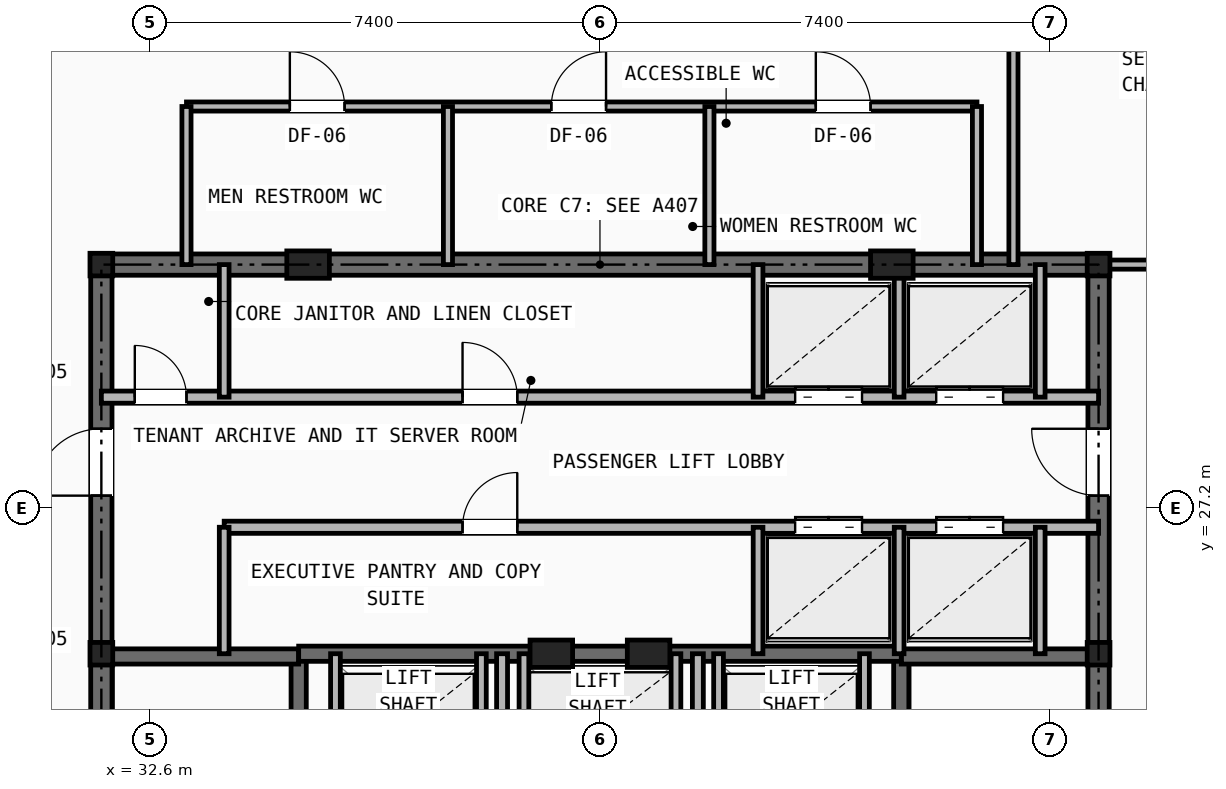
"""IFC4 building model, lengths in metres.
Left out: names, types, materials, properties, quantities, classifications, styles, units other than length and angle.
Written with IfcOpenShell. Run it as: python <this file> out.ifc"""

import sys

from ifc_helpers import new_model, si_unit, direction, frame, frame_2d, origin, origin_2d, place, context, subcontext, project, spatial, rectangle, i_section, extrude, element, fill, save


model = new_model("IFC4")
c1 = context("Model", 3, precision=1e-05, world=origin(), true_north=direction((0.0, 1.0)))
c2 = subcontext(c1, "Body", "Model", "MODEL_VIEW")
j1 = project(units=[si_unit("LENGTHUNIT", "METRE"), si_unit("PLANEANGLEUNIT", "RADIAN")], contexts=[c1])
p1 = place(None, origin())
s1 = spatial("IfcSite", under=j1, at=p1, CompositionType="ELEMENT")
p2 = place(p1, origin())
s2 = spatial("IfcBuilding", under=s1, at=p2, CompositionType="ELEMENT")
p3 = place(p2, frame((0.0, 0.0, 236.4)))
s3 = spatial("IfcBuildingStorey", under=s2, at=p3, CompositionType="ELEMENT", Elevation=236.4)
for number, where, z_axis, x_axis in (
    (1, (31.8, 24.8, 0.0), (0.0, 0.0, 1.0), (1.0, 0.0, 0.0)),
    (2, (48.2, 24.8, 0.0), (0.0, 0.0, 1.0), (1.0, 0.0, 0.0)),
    (3, (31.8, 31.2, 0.0), (0.0, 0.0, 1.0), (1.0, 0.0, 0.0)),
    (4, (48.2, 31.2, 0.0), (0.0, 0.0, 1.0), (1.0, 0.0, 0.0)),
):
    element("IfcColumn", number, at=place(p3, frame(where, z_axis=z_axis, x_axis=x_axis)), inside=s3, PredefinedType="COLUMN", context=c2, shape_type="SweptSolid", body=[
        extrude(i_section(OverallWidth=0.374, OverallDepth=0.372, WebThickness=0.016, FlangeThickness=0.026, at=origin_2d()), origin(), (0.0, 0.0, 1.0), 3.5),
    ])
for number, where, z_axis, x_axis in (
    (5, (35.2, 31.2, 0.0), (0.0, 0.0, 1.0), (1.0, 0.0, 0.0)),
    (6, (44.8, 31.2, 0.0), (0.0, 0.0, 1.0), (1.0, 0.0, 0.0)),
    (7, (39.2, 24.8, 0.0), (0.0, 0.0, 1.0), (1.0, 0.0, 0.0)),
    (8, (40.8, 24.8, 0.0), (0.0, 0.0, 1.0), (1.0, 0.0, 0.0)),
):
    element("IfcColumn", number, at=place(p3, frame(where, z_axis=z_axis, x_axis=x_axis)), inside=s3, PredefinedType="PILASTER", context=c2, shape_type="SweptSolid", body=[
        extrude(rectangle(XDim=0.7, YDim=0.45, at=origin_2d()), origin(), (0.0, 0.0, 1.0), 3.5),
    ])
p4 = place(p3, frame((31.8, 31.2, 0.0), z_axis=(0.0, 0.0, 1.0), x_axis=(1.0, 0.0, 0.0)))
e9 = element("IfcWall", 9, at=p4, inside=s3, PredefinedType="SHEAR", context=c2, shape_type="SweptSolid", body=[
    extrude(rectangle(XDim=16.4, YDim=0.35, at=frame_2d((8.2, 0.0))), origin(), (0.0, 0.0, 1.0), 3.25),
])
p5 = place(p3, frame((31.8, 16.4, 0.0), z_axis=(0.0, 0.0, 1.0), x_axis=(0.0, 1.0, 0.0)))
e10 = element("IfcWall", 10, at=p5, inside=s3, PredefinedType="SHEAR", context=c2, shape_type="SweptSolid", body=[
    extrude(rectangle(XDim=14.8, YDim=0.35, at=frame_2d((7.4, 0.0))), origin(), (0.0, 0.0, 1.0), 3.25),
])
p6 = place(p5, frame((11.0, 0.0, 0.0)))
e11 = element("IfcOpeningElement", 11, at=p6, cuts=e10, PredefinedType="OPENING", context=c2, shape_type="SweptSolid", body=[
    extrude(rectangle(XDim=1.1, YDim=2.15, at=frame_2d((0.55, 1.075))), frame((0.0, 0.185, 0.0), z_axis=(0.0, -1.0, 0.0), x_axis=(1.0, 0.0, 0.0)), (0.0, 0.0, 1.0), 0.37),
])
p7 = place(p3, frame((48.2, 16.4, 0.0), z_axis=(0.0, 0.0, 1.0), x_axis=(0.0, 1.0, 0.0)))
e12 = element("IfcWall", 12, at=p7, inside=s3, PredefinedType="SHEAR", context=c2, shape_type="SweptSolid", body=[
    extrude(rectangle(XDim=14.8, YDim=0.35, at=frame_2d((7.4, 0.0))), origin(), (0.0, 0.0, 1.0), 3.25),
])
p8 = place(p7, frame((11.0, 0.0, 0.0)))
e13 = element("IfcOpeningElement", 13, at=p8, cuts=e12, PredefinedType="OPENING", context=c2, shape_type="SweptSolid", body=[
    extrude(rectangle(XDim=1.1, YDim=2.15, at=frame_2d((0.55, 1.075))), frame((0.0, 0.185, 0.0), z_axis=(0.0, -1.0, 0.0), x_axis=(1.0, 0.0, 0.0)), (0.0, 0.0, 1.0), 0.37),
])
p9 = place(p3, frame((35.045, 16.4, 0.0), z_axis=(0.0, 0.0, 1.0), x_axis=(0.0, 1.0, 0.0)))
e14 = element("IfcWall", 14, at=p9, inside=s3, PredefinedType="SHEAR", context=c2, shape_type="SweptSolid", body=[
    extrude(rectangle(XDim=8.4, YDim=0.25, at=frame_2d((4.2, 0.0))), origin(), (0.0, 0.0, 1.0), 3.25),
])
p10 = place(p9, frame((0.45, 0.0, 0.0)))
e15 = element("IfcOpeningElement", 15, at=p10, cuts=e14, PredefinedType="OPENING", context=c2, shape_type="SweptSolid", body=[
    extrude(rectangle(XDim=0.95, YDim=2.1, at=frame_2d((0.475, 1.05))), frame((0.0, 0.135, 0.0), z_axis=(0.0, -1.0, 0.0), x_axis=(1.0, 0.0, 0.0)), (0.0, 0.0, 1.0), 0.27),
])
p11 = place(p3, frame((31.8, 24.755, 0.0), z_axis=(0.0, 0.0, 1.0), x_axis=(1.0, 0.0, 0.0)))
e16 = element("IfcWall", 16, at=p11, inside=s3, PredefinedType="SHEAR", context=c2, shape_type="SweptSolid", body=[
    extrude(rectangle(XDim=3.245, YDim=0.25, at=frame_2d((1.623, 0.0))), origin(), (0.0, 0.0, 1.0), 3.25),
])
p12 = place(p3, frame((44.955, 16.4, 0.0), z_axis=(0.0, 0.0, 1.0), x_axis=(0.0, 1.0, 0.0)))
e17 = element("IfcWall", 17, at=p12, inside=s3, PredefinedType="SHEAR", context=c2, shape_type="SweptSolid", body=[
    extrude(rectangle(XDim=8.4, YDim=0.25, at=frame_2d((4.2, 0.0))), origin(), (0.0, 0.0, 1.0), 3.25),
])
p13 = place(p12, frame((0.45, 0.0, 0.0)))
e18 = element("IfcOpeningElement", 18, at=p13, cuts=e17, PredefinedType="OPENING", context=c2, shape_type="SweptSolid", body=[
    extrude(rectangle(XDim=0.95, YDim=2.1, at=frame_2d((0.475, 1.05))), frame((0.0, 0.135, 0.0), z_axis=(0.0, -1.0, 0.0), x_axis=(1.0, 0.0, 0.0)), (0.0, 0.0, 1.0), 0.27),
])
p14 = place(p3, frame((44.955, 24.755, 0.0), z_axis=(0.0, 0.0, 1.0), x_axis=(1.0, 0.0, 0.0)))
e19 = element("IfcWall", 19, at=p14, inside=s3, PredefinedType="SHEAR", context=c2, shape_type="SweptSolid", body=[
    extrude(rectangle(XDim=3.245, YDim=0.25, at=frame_2d((1.623, 0.0))), origin(), (0.0, 0.0, 1.0), 3.25),
])
p15 = place(p3, frame((35.045, 24.8, 0.0), z_axis=(0.0, 0.0, 1.0), x_axis=(1.0, 0.0, 0.0)))
e20 = element("IfcWall", 20, at=p15, inside=s3, PredefinedType="SHEAR", context=c2, shape_type="SweptSolid", body=[
    extrude(rectangle(XDim=9.91, YDim=0.25, at=frame_2d((4.955, 0.0))), origin(), (0.0, 0.0, 1.0), 3.25),
])
p16 = place(p3, frame((38.39, 16.4, 0.0), z_axis=(0.0, 0.0, 1.0), x_axis=(0.0, 1.0, 0.0)))
e21 = element("IfcWall", 21, at=p16, inside=s3, PredefinedType="PARTITIONING", context=c2, shape_type="SweptSolid", body=[
    extrude(rectangle(XDim=8.4, YDim=0.18, at=frame_2d((4.2, 0.0))), origin(), (0.0, 0.0, 1.0), 2.705),
])
p17 = place(p16, frame((3.8, 0.0, 0.0)))
e22 = element("IfcOpeningElement", 22, at=p17, cuts=e21, PredefinedType="OPENING", context=c2, shape_type="SweptSolid", body=[
    extrude(rectangle(XDim=0.95, YDim=2.1, at=frame_2d((0.475, 1.05))), frame((0.0, 0.1, 0.0), z_axis=(0.0, -1.0, 0.0), x_axis=(1.0, 0.0, 0.0)), (0.0, 0.0, 1.0), 0.2),
])
p18 = place(p3, frame((41.61, 16.4, 0.0), z_axis=(0.0, 0.0, 1.0), x_axis=(0.0, 1.0, 0.0)))
e23 = element("IfcWall", 23, at=p18, inside=s3, PredefinedType="PARTITIONING", context=c2, shape_type="SweptSolid", body=[
    extrude(rectangle(XDim=8.4, YDim=0.18, at=frame_2d((4.2, 0.0))), origin(), (0.0, 0.0, 1.0), 2.705),
])
for number, where, z_axis, x_axis in (
    (24, (35.65, 22.48, 0.0), (0.0, 0.0, 1.0), (0.0, 1.0, 0.0)),
    (25, (38.05, 22.48, 0.0), (0.0, 0.0, 1.0), (0.0, 1.0, 0.0)),
    (26, (41.95, 22.48, 0.0), (0.0, 0.0, 1.0), (0.0, 1.0, 0.0)),
    (27, (44.35, 22.48, 0.0), (0.0, 0.0, 1.0), (0.0, 1.0, 0.0)),
    (28, (38.75, 22.48, 0.0), (0.0, 0.0, 1.0), (0.0, 1.0, 0.0)),
    (29, (41.25, 22.48, 0.0), (0.0, 0.0, 1.0), (0.0, 1.0, 0.0)),
):
    element("IfcWall", number, at=place(p3, frame(where, z_axis=z_axis, x_axis=x_axis)), inside=s3, PredefinedType="SOLIDWALL", context=c2, shape_type="SweptSolid", body=[
        extrude(rectangle(XDim=2.32, YDim=0.16, at=frame_2d((1.16, 0.0))), origin(), (0.0, 0.0, 1.0), 3.25),
    ])
p19 = place(p3, frame((31.8, 29.02, 0.0), z_axis=(0.0, 0.0, 1.0), x_axis=(1.0, 0.0, 0.0)))
e30 = element("IfcWall", 30, at=p19, inside=s3, PredefinedType="SOLIDWALL", context=c2, shape_type="SweptSolid", body=[
    extrude(rectangle(XDim=16.4, YDim=0.2, at=frame_2d((8.2, 0.0))), origin(), (0.0, 0.0, 1.0), 2.705),
])
p20 = place(p19, frame((0.55, 0.0, 0.0)))
e31 = element("IfcOpeningElement", 31, at=p20, cuts=e30, PredefinedType="OPENING", context=c2, shape_type="SweptSolid", body=[
    extrude(rectangle(XDim=0.85, YDim=2.05, at=frame_2d((0.425, 1.025))), frame((0.0, 0.11, 0.0), z_axis=(0.0, -1.0, 0.0), x_axis=(1.0, 0.0, 0.0)), (0.0, 0.0, 1.0), 0.22),
])
p21 = place(p19, frame((5.94, 0.0, 0.0)))
e32 = element("IfcOpeningElement", 32, at=p21, cuts=e30, PredefinedType="OPENING", context=c2, shape_type="SweptSolid", body=[
    extrude(rectangle(XDim=0.9, YDim=2.1, at=frame_2d((0.45, 1.05))), frame((0.0, 0.11, 0.0), z_axis=(0.0, -1.0, 0.0), x_axis=(1.0, 0.0, 0.0)), (0.0, 0.0, 1.0), 0.22),
])
p22 = place(p19, frame((11.41, 0.0, 0.0)))
e33 = element("IfcOpeningElement", 33, at=p22, cuts=e30, PredefinedType="OPENING", context=c2, shape_type="SweptSolid", body=[
    extrude(rectangle(XDim=1.1, YDim=2.15, at=frame_2d((0.55, 1.075))), frame((0.0, 0.11, 0.0), z_axis=(0.0, -1.0, 0.0), x_axis=(1.0, 0.0, 0.0)), (0.0, 0.0, 1.0), 0.22),
])
p23 = place(p19, frame((13.73, 0.0, 0.0)))
e34 = element("IfcOpeningElement", 34, at=p23, cuts=e30, PredefinedType="OPENING", context=c2, shape_type="SweptSolid", body=[
    extrude(rectangle(XDim=1.1, YDim=2.15, at=frame_2d((0.55, 1.075))), frame((0.0, 0.11, 0.0), z_axis=(0.0, -1.0, 0.0), x_axis=(1.0, 0.0, 0.0)), (0.0, 0.0, 1.0), 0.22),
])
p24 = place(p3, frame((33.82, 26.88, 0.0), z_axis=(0.0, 0.0, 1.0), x_axis=(1.0, 0.0, 0.0)))
e35 = element("IfcWall", 35, at=p24, inside=s3, PredefinedType="SOLIDWALL", context=c2, shape_type="SweptSolid", body=[
    extrude(rectangle(XDim=14.38, YDim=0.2, at=frame_2d((7.19, 0.0))), origin(), (0.0, 0.0, 1.0), 2.705),
])
p25 = place(p24, frame((3.92, 0.0, 0.0)))
e36 = element("IfcOpeningElement", 36, at=p25, cuts=e35, PredefinedType="OPENING", context=c2, shape_type="SweptSolid", body=[
    extrude(rectangle(XDim=0.9, YDim=2.1, at=frame_2d((0.45, 1.05))), frame((0.0, 0.11, 0.0), z_axis=(0.0, -1.0, 0.0), x_axis=(1.0, 0.0, 0.0)), (0.0, 0.0, 1.0), 0.22),
])
p26 = place(p24, frame((9.39, 0.0, 0.0)))
e37 = element("IfcOpeningElement", 37, at=p26, cuts=e35, PredefinedType="OPENING", context=c2, shape_type="SweptSolid", body=[
    extrude(rectangle(XDim=1.1, YDim=2.15, at=frame_2d((0.55, 1.075))), frame((0.0, 0.11, 0.0), z_axis=(0.0, -1.0, 0.0), x_axis=(1.0, 0.0, 0.0)), (0.0, 0.0, 1.0), 0.22),
])
p27 = place(p24, frame((11.71, 0.0, 0.0)))
e38 = element("IfcOpeningElement", 38, at=p27, cuts=e35, PredefinedType="OPENING", context=c2, shape_type="SweptSolid", body=[
    extrude(rectangle(XDim=1.1, YDim=2.15, at=frame_2d((0.55, 1.075))), frame((0.0, 0.11, 0.0), z_axis=(0.0, -1.0, 0.0), x_axis=(1.0, 0.0, 0.0)), (0.0, 0.0, 1.0), 0.22),
])
p28 = place(p3, frame((33.82, 29.02, 0.0), z_axis=(0.0, 0.0, 1.0), x_axis=(0.0, 1.0, 0.0)))
e39 = element("IfcWall", 39, at=p28, inside=s3, PredefinedType="SOLIDWALL", context=c2, shape_type="SweptSolid", body=[
    extrude(rectangle(XDim=2.18, YDim=0.16, at=frame_2d((1.09, 0.0))), origin(), (0.0, 0.0, 1.0), 2.705),
])
p29 = place(p3, frame((33.82, 24.8, 0.0), z_axis=(0.0, 0.0, 1.0), x_axis=(0.0, 1.0, 0.0)))
e40 = element("IfcWall", 40, at=p29, inside=s3, PredefinedType="SOLIDWALL", context=c2, shape_type="SweptSolid", body=[
    extrude(rectangle(XDim=2.08, YDim=0.16, at=frame_2d((1.04, 0.0))), origin(), (0.0, 0.0, 1.0), 3.25),
])
for number, where, z_axis, x_axis in (
    (41, (42.6, 29.02, 0.0), (0.0, 0.0, 1.0), (0.0, 1.0, 0.0)),
    (42, (44.92, 29.02, 0.0), (0.0, 0.0, 1.0), (0.0, 1.0, 0.0)),
    (43, (47.24, 29.02, 0.0), (0.0, 0.0, 1.0), (0.0, 1.0, 0.0)),
):
    element("IfcWall", number, at=place(p3, frame(where, z_axis=z_axis, x_axis=x_axis)), inside=s3, PredefinedType="SOLIDWALL", context=c2, shape_type="SweptSolid", body=[
        extrude(rectangle(XDim=2.18, YDim=0.16, at=frame_2d((1.09, 0.0))), origin(), (0.0, 0.0, 1.0), 2.705),
    ])
for number, where, z_axis, x_axis in (
    (44, (42.6, 24.8, 0.0), (0.0, 0.0, 1.0), (0.0, 1.0, 0.0)),
    (45, (44.92, 24.8, 0.0), (0.0, 0.0, 1.0), (0.0, 1.0, 0.0)),
    (46, (47.24, 24.8, 0.0), (0.0, 0.0, 1.0), (0.0, 1.0, 0.0)),
):
    element("IfcWall", number, at=place(p3, frame(where, z_axis=z_axis, x_axis=x_axis)), inside=s3, PredefinedType="SOLIDWALL", context=c2, shape_type="SweptSolid", body=[
        extrude(rectangle(XDim=2.08, YDim=0.16, at=frame_2d((1.04, 0.0))), origin(), (0.0, 0.0, 1.0), 3.25),
    ])
p30 = place(p3, frame((33.2, 33.8, 0.0), z_axis=(0.0, 0.0, 1.0), x_axis=(1.0, 0.0, 0.0)))
e47 = element("IfcWall", 47, at=p30, inside=s3, PredefinedType="PARTITIONING", context=c2, shape_type="SweptSolid", body=[
    extrude(rectangle(XDim=13.0, YDim=0.15, at=frame_2d((6.5, 0.0))), origin(), (0.0, 0.0, 1.0), 3.25),
])
p31 = place(p30, frame((1.7, 0.0, 0.0)))
e48 = element("IfcOpeningElement", 48, at=p31, cuts=e47, PredefinedType="OPENING", context=c2, shape_type="SweptSolid", body=[
    extrude(rectangle(XDim=0.9, YDim=2.1, at=frame_2d((0.45, 1.05))), frame((0.0, 0.085, 0.0), z_axis=(0.0, -1.0, 0.0), x_axis=(1.0, 0.0, 0.0)), (0.0, 0.0, 1.0), 0.17),
])
p32 = place(p30, frame((6.0, 0.0, 0.0)))
e49 = element("IfcOpeningElement", 49, at=p32, cuts=e47, PredefinedType="OPENING", context=c2, shape_type="SweptSolid", body=[
    extrude(rectangle(XDim=0.9, YDim=2.1, at=frame_2d((0.45, 1.05))), frame((0.0, 0.085, 0.0), z_axis=(0.0, -1.0, 0.0), x_axis=(1.0, 0.0, 0.0)), (0.0, 0.0, 1.0), 0.17),
])
p33 = place(p30, frame((10.35, 0.0, 0.0)))
e50 = element("IfcOpeningElement", 50, at=p33, cuts=e47, PredefinedType="OPENING", context=c2, shape_type="SweptSolid", body=[
    extrude(rectangle(XDim=0.9, YDim=2.1, at=frame_2d((0.45, 1.05))), frame((0.0, 0.085, 0.0), z_axis=(0.0, -1.0, 0.0), x_axis=(1.0, 0.0, 0.0)), (0.0, 0.0, 1.0), 0.17),
])
for number, where, z_axis, x_axis in (
    (51, (33.2, 31.2, 0.0), (0.0, 0.0, 1.0), (0.0, 1.0, 0.0)),
    (52, (46.2, 31.2, 0.0), (0.0, 0.0, 1.0), (0.0, 1.0, 0.0)),
    (53, (37.5, 31.2, 0.0), (0.0, 0.0, 1.0), (0.0, 1.0, 0.0)),
    (54, (41.8, 31.2, 0.0), (0.0, 0.0, 1.0), (0.0, 1.0, 0.0)),
):
    element("IfcWall", number, at=place(p3, frame(where, z_axis=z_axis, x_axis=x_axis)), inside=s3, PredefinedType="PARTITIONING", context=c2, shape_type="SweptSolid", body=[
        extrude(rectangle(XDim=2.6, YDim=0.15, at=frame_2d((1.3, 0.0))), origin(), (0.0, 0.0, 1.0), 2.705),
    ])
p34 = place(p3, frame((46.8, 31.2, 0.0), z_axis=(0.0, 0.0, 1.0), x_axis=(0.0, 1.0, 0.0)))
e55 = element("IfcWall", 55, at=p34, inside=s3, PredefinedType="PARTITIONING", context=c2, shape_type="SweptSolid", body=[
    extrude(rectangle(XDim=4.5, YDim=0.15, at=frame_2d((2.25, 0.0))), origin(), (0.0, 0.0, 1.0), 2.705),
])
p35 = place(p3, frame((48.2, 31.2, 0.0), z_axis=(0.0, 0.0, 1.0), x_axis=(1.0, 0.0, 0.0)))
e56 = element("IfcWall", 56, at=p35, inside=s3, PredefinedType="PARTITIONING", context=c2, shape_type="SweptSolid", body=[
    extrude(rectangle(XDim=5.177, YDim=0.15, at=frame_2d((2.589, 0.0))), origin(), (0.0, 0.0, 1.0), 2.292),
])
p36 = place(p35, frame((1.4, 0.0, 0.0)))
e57 = element("IfcOpeningElement", 57, at=p36, cuts=e56, PredefinedType="OPENING", context=c2, shape_type="SweptSolid", body=[
    extrude(rectangle(XDim=0.95, YDim=2.1, at=frame_2d((0.475, 1.05))), frame((0.0, 0.085, 0.0), z_axis=(0.0, -1.0, 0.0), x_axis=(1.0, 0.0, 0.0)), (0.0, 0.0, 1.0), 0.17),
])
p37 = place(p20, origin())
e58 = element("IfcDoor", 58, at=p37, inside=s3, OperationType="SINGLE_SWING_LEFT", PredefinedType="DOOR", context=c2, shape_type="SweptSolid", body=[
    extrude(rectangle(XDim=0.85, YDim=2.05, at=frame_2d((0.425, 1.025))), frame((0.0, 0.025, 0.0), z_axis=(0.0, -1.0, 0.0), x_axis=(1.0, 0.0, 0.0)), (0.0, 0.0, 1.0), 0.05),
])
fill(e31, e58)
p38 = place(p6, origin())
e59 = element("IfcDoor", 59, at=p38, inside=s3, OperationType="SINGLE_SWING_LEFT", PredefinedType="DOOR", context=c2, shape_type="SweptSolid", body=[
    extrude(rectangle(XDim=1.1, YDim=2.15, at=frame_2d((0.55, 1.075))), frame((0.0, 0.025, 0.0), z_axis=(0.0, -1.0, 0.0), x_axis=(1.0, 0.0, 0.0)), (0.0, 0.0, 1.0), 0.05),
])
fill(e11, e59)
p39 = place(p8, origin())
e60 = element("IfcDoor", 60, at=p39, inside=s3, OperationType="SINGLE_SWING_RIGHT", PredefinedType="DOOR", context=c2, shape_type="SweptSolid", body=[
    extrude(rectangle(XDim=1.1, YDim=2.15, at=frame_2d((0.55, 1.075))), frame((0.0, 0.025, 0.0), z_axis=(0.0, -1.0, 0.0), x_axis=(1.0, 0.0, 0.0)), (0.0, 0.0, 1.0), 0.05),
])
fill(e13, e60)
p40 = place(p21, origin())
e61 = element("IfcDoor", 61, at=p40, inside=s3, OperationType="SINGLE_SWING_LEFT", PredefinedType="DOOR", context=c2, shape_type="SweptSolid", body=[
    extrude(rectangle(XDim=0.9, YDim=2.1, at=frame_2d((0.45, 1.05))), frame((0.0, 0.025, 0.0), z_axis=(0.0, -1.0, 0.0), x_axis=(1.0, 0.0, 0.0)), (0.0, 0.0, 1.0), 0.05),
])
fill(e32, e61)
p41 = place(p25, origin())
e62 = element("IfcDoor", 62, at=p41, inside=s3, OperationType="SINGLE_SWING_RIGHT", PredefinedType="DOOR", context=c2, shape_type="SweptSolid", body=[
    extrude(rectangle(XDim=0.9, YDim=2.1, at=frame_2d((0.45, 1.05))), frame((0.0, 0.025, 0.0), z_axis=(0.0, -1.0, 0.0), x_axis=(1.0, 0.0, 0.0)), (0.0, 0.0, 1.0), 0.05),
])
fill(e36, e62)
p42 = place(p22, origin())
e63 = element("IfcDoor", 63, at=p42, inside=s3, OperationType="DOUBLE_DOOR_SLIDING", PredefinedType="DOOR", context=c2, shape_type="SweptSolid", body=[
    extrude(rectangle(XDim=1.1, YDim=2.15, at=frame_2d((0.55, 1.075))), frame((0.0, 0.025, 0.0), z_axis=(0.0, -1.0, 0.0), x_axis=(1.0, 0.0, 0.0)), (0.0, 0.0, 1.0), 0.05),
])
fill(e33, e63)
p43 = place(p23, origin())
e64 = element("IfcDoor", 64, at=p43, inside=s3, OperationType="DOUBLE_DOOR_SLIDING", PredefinedType="DOOR", context=c2, shape_type="SweptSolid", body=[
    extrude(rectangle(XDim=1.1, YDim=2.15, at=frame_2d((0.55, 1.075))), frame((0.0, 0.025, 0.0), z_axis=(0.0, -1.0, 0.0), x_axis=(1.0, 0.0, 0.0)), (0.0, 0.0, 1.0), 0.05),
])
fill(e34, e64)
p44 = place(p26, origin())
e65 = element("IfcDoor", 65, at=p44, inside=s3, OperationType="DOUBLE_DOOR_SLIDING", PredefinedType="DOOR", context=c2, shape_type="SweptSolid", body=[
    extrude(rectangle(XDim=1.1, YDim=2.15, at=frame_2d((0.55, 1.075))), frame((0.0, 0.025, 0.0), z_axis=(0.0, -1.0, 0.0), x_axis=(1.0, 0.0, 0.0)), (0.0, 0.0, 1.0), 0.05),
])
fill(e37, e65)
p45 = place(p27, origin())
e66 = element("IfcDoor", 66, at=p45, inside=s3, OperationType="DOUBLE_DOOR_SLIDING", PredefinedType="DOOR", context=c2, shape_type="SweptSolid", body=[
    extrude(rectangle(XDim=1.1, YDim=2.15, at=frame_2d((0.55, 1.075))), frame((0.0, 0.025, 0.0), z_axis=(0.0, -1.0, 0.0), x_axis=(1.0, 0.0, 0.0)), (0.0, 0.0, 1.0), 0.05),
])
fill(e38, e66)
p46 = place(p31, origin())
e67 = element("IfcDoor", 67, at=p46, inside=s3, OperationType="SINGLE_SWING_LEFT", PredefinedType="DOOR", context=c2, shape_type="SweptSolid", body=[
    extrude(rectangle(XDim=0.9, YDim=2.1, at=frame_2d((0.45, 1.05))), frame((0.0, 0.025, 0.0), z_axis=(0.0, -1.0, 0.0), x_axis=(1.0, 0.0, 0.0)), (0.0, 0.0, 1.0), 0.05),
])
fill(e48, e67)
p47 = place(p32, origin())
e68 = element("IfcDoor", 68, at=p47, inside=s3, OperationType="SINGLE_SWING_RIGHT", PredefinedType="DOOR", context=c2, shape_type="SweptSolid", body=[
    extrude(rectangle(XDim=0.9, YDim=2.1, at=frame_2d((0.45, 1.05))), frame((0.0, 0.025, 0.0), z_axis=(0.0, -1.0, 0.0), x_axis=(1.0, 0.0, 0.0)), (0.0, 0.0, 1.0), 0.05),
])
fill(e49, e68)
p48 = place(p33, origin())
e69 = element("IfcDoor", 69, at=p48, inside=s3, OperationType="SINGLE_SWING_LEFT", PredefinedType="DOOR", context=c2, shape_type="SweptSolid", body=[
    extrude(rectangle(XDim=0.9, YDim=2.1, at=frame_2d((0.45, 1.05))), frame((0.0, 0.025, 0.0), z_axis=(0.0, -1.0, 0.0), x_axis=(1.0, 0.0, 0.0)), (0.0, 0.0, 1.0), 0.05),
])
fill(e50, e69)
save(model, sys.argv[1])
